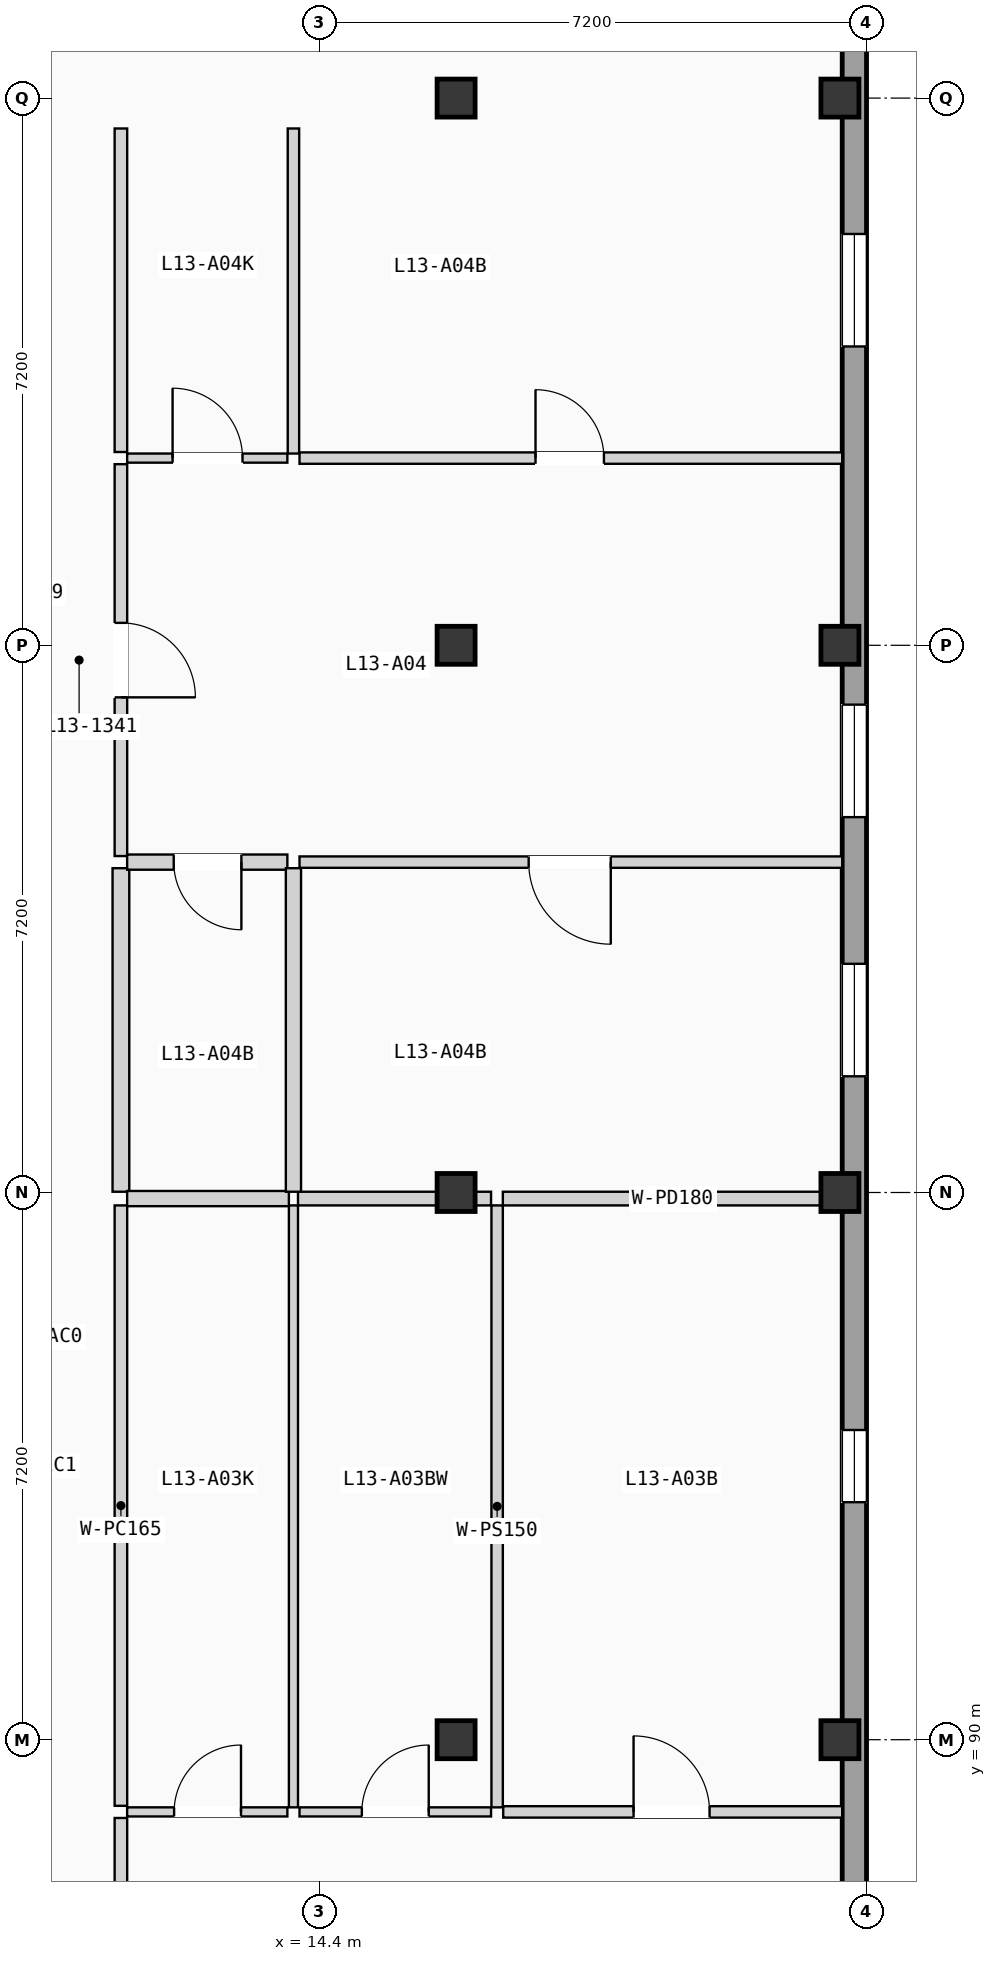
"""IFC4 building model, lengths in metres.
Left out: names, types, materials, properties, quantities, classifications, styles, units other than length and angle.
Written with IfcOpenShell. Run it as: python <this file> out.ifc"""

import sys

from ifc_helpers import new_model, si_unit, direction, frame, frame_2d, origin, origin_2d, place, context, subcontext, project, spatial, rectangle, extrude, element, fill, save


model = new_model("IFC4")
c1 = context("Model", 3, precision=1e-05, world=origin(), true_north=direction((0.0, 1.0)))
c2 = subcontext(c1, "Body", "Model", "MODEL_VIEW")
j1 = project(units=[si_unit("LENGTHUNIT", "METRE"), si_unit("PLANEANGLEUNIT", "RADIAN")], contexts=[c1])
p1 = place(None, origin())
s1 = spatial("IfcSite", under=j1, at=p1, CompositionType="ELEMENT")
p2 = place(p1, origin())
s2 = spatial("IfcBuilding", under=s1, at=p2, CompositionType="ELEMENT")
p3 = place(p2, frame((0.0, 0.0, 43.575)))
s3 = spatial("IfcBuildingStorey", under=s2, at=p3, CompositionType="ELEMENT", Elevation=43.575)
for number, where, z_axis, x_axis in (
    (1, (16.2, 90.0, 0.0), (0.0, 0.0, 1.0), (1.0, 0.0, 0.0)),
    (2, (16.2, 97.2, 0.0), (0.0, 0.0, 1.0), (1.0, 0.0, 0.0)),
    (3, (16.2, 104.4, 0.0), (0.0, 0.0, 1.0), (1.0, 0.0, 0.0)),
    (4, (16.2, 111.6, 0.0), (0.0, 0.0, 1.0), (1.0, 0.0, 0.0)),
    (5, (21.25, 90.0, 0.0), (0.0, 0.0, 1.0), (1.0, 0.0, 0.0)),
    (6, (21.25, 97.2, 0.0), (0.0, 0.0, 1.0), (1.0, 0.0, 0.0)),
    (7, (21.25, 104.4, 0.0), (0.0, 0.0, 1.0), (1.0, 0.0, 0.0)),
    (8, (21.25, 111.6, 0.0), (0.0, 0.0, 1.0), (1.0, 0.0, 0.0)),
):
    element("IfcColumn", number, at=place(p3, frame(where, z_axis=z_axis, x_axis=x_axis)), inside=s3, PredefinedType="COLUMN", context=c2, shape_type="SweptSolid", body=[
        extrude(rectangle(XDim=0.5, YDim=0.5, at=origin_2d()), origin(), (0.0, 0.0, 1.0), 3.15),
    ])
p4 = place(p3, frame((21.44, 68.72, 0.0), z_axis=(0.0, 0.0, 1.0), x_axis=(0.0, 1.0, 0.0)))
e9 = element("IfcWall", 9, at=p4, inside=s3, PredefinedType="SOLIDWALL", context=c2, shape_type="SweptSolid", body=[
    extrude(rectangle(XDim=49.76, YDim=0.32, at=frame_2d((24.88, 0.0))), origin(), (0.0, 0.0, 1.0), 2.6),
])
p5 = place(p4, frame((17.005, 0.0, 0.665)))
e10 = element("IfcOpeningElement", 10, at=p5, cuts=e9, PredefinedType="OPENING", context=c2, shape_type="SweptSolid", body=[
    extrude(rectangle(XDim=1.35, YDim=1.5, at=frame_2d((0.675, 0.75))), frame((0.0, 0.17, 0.0), z_axis=(0.0, -1.0, 0.0), x_axis=(1.0, 0.0, 0.0)), (0.0, 0.0, 1.0), 0.34),
])
p6 = place(p4, frame((9.87, 0.0, 0.515)))
e11 = element("IfcOpeningElement", 11, at=p6, cuts=e9, PredefinedType="OPENING", context=c2, shape_type="SweptSolid", body=[
    extrude(rectangle(XDim=1.35, YDim=1.65, at=frame_2d((0.675, 0.825))), frame((0.0, 0.17, 0.0), z_axis=(0.0, -1.0, 0.0), x_axis=(1.0, 0.0, 0.0)), (0.0, 0.0, 1.0), 0.34),
])
p7 = place(p4, frame((24.405, 0.0, 0.85)))
e12 = element("IfcOpeningElement", 12, at=p7, cuts=e9, PredefinedType="OPENING", context=c2, shape_type="SweptSolid", body=[
    extrude(rectangle(XDim=0.95, YDim=1.2, at=frame_2d((0.475, 0.6))), frame((0.0, 0.17, 0.0), z_axis=(0.0, -1.0, 0.0), x_axis=(1.0, 0.0, 0.0)), (0.0, 0.0, 1.0), 0.34),
])
p8 = place(p4, frame((33.419, 0.0, 0.9)))
e13 = element("IfcOpeningElement", 13, at=p8, cuts=e9, PredefinedType="OPENING", context=c2, shape_type="SweptSolid", body=[
    extrude(rectangle(XDim=1.48, YDim=1.2, at=frame_2d((0.74, 0.6))), frame((0.0, 0.17, 0.0), z_axis=(0.0, -1.0, 0.0), x_axis=(1.0, 0.0, 0.0)), (0.0, 0.0, 1.0), 0.34),
])
p9 = place(p4, frame((30.009, 0.0, 0.815)))
e14 = element("IfcOpeningElement", 14, at=p9, cuts=e9, PredefinedType="OPENING", context=c2, shape_type="SweptSolid", body=[
    extrude(rectangle(XDim=1.48, YDim=1.35, at=frame_2d((0.74, 0.675))), frame((0.0, 0.17, 0.0), z_axis=(0.0, -1.0, 0.0), x_axis=(1.0, 0.0, 0.0)), (0.0, 0.0, 1.0), 0.34),
])
p10 = place(p4, frame((39.612, 0.0, 0.665)))
e15 = element("IfcOpeningElement", 15, at=p10, cuts=e9, PredefinedType="OPENING", context=c2, shape_type="SweptSolid", body=[
    extrude(rectangle(XDim=1.48, YDim=1.5, at=frame_2d((0.74, 0.75))), frame((0.0, 0.17, 0.0), z_axis=(0.0, -1.0, 0.0), x_axis=(1.0, 0.0, 0.0)), (0.0, 0.0, 1.0), 0.34),
])
p11 = place(p3, frame((11.79, 83.83, 0.0), z_axis=(0.0, 0.0, 1.0), x_axis=(0.0, 1.0, 0.0)))
e16 = element("IfcWall", 16, at=p11, inside=s3, PredefinedType="PARTITIONING", context=c2, shape_type="SweptSolid", body=[
    extrude(rectangle(XDim=5.14, YDim=0.165, at=frame_2d((2.57, 0.0))), origin(), (0.0, 0.0, 1.0), 2.87),
])
p12 = place(p11, frame((2.08, 0.0, 0.0)))
e17 = element("IfcOpeningElement", 17, at=p12, cuts=e16, PredefinedType="OPENING", context=c2, shape_type="SweptSolid", body=[
    extrude(rectangle(XDim=0.98, YDim=2.08, at=frame_2d((0.49, 1.04))), frame((0.0, 0.093, 0.0), z_axis=(0.0, -1.0, 0.0), x_axis=(1.0, 0.0, 0.0)), (0.0, 0.0, 1.0), 0.185),
])
p13 = place(p3, frame((11.79, 89.13, 0.0), z_axis=(0.0, 0.0, 1.0), x_axis=(0.0, 1.0, 0.0)))
e18 = element("IfcWall", 18, at=p13, inside=s3, PredefinedType="PARTITIONING", context=c2, shape_type="SweptSolid", body=[
    extrude(rectangle(XDim=7.9, YDim=0.165, at=frame_2d((3.95, 0.0))), origin(), (0.0, 0.0, 1.0), 2.87),
])
p14 = place(p3, frame((11.79, 101.627, 0.0), z_axis=(0.0, 0.0, 1.0), x_axis=(0.0, 1.0, 0.0)))
e19 = element("IfcWall", 19, at=p14, inside=s3, PredefinedType="PARTITIONING", context=c2, shape_type="SweptSolid", body=[
    extrude(rectangle(XDim=5.156, YDim=0.165, at=frame_2d((2.578, 0.0))), origin(), (0.0, 0.0, 1.0), 2.87),
])
p15 = place(p14, frame((2.088, 0.0, 0.0)))
e20 = element("IfcOpeningElement", 20, at=p15, cuts=e19, PredefinedType="OPENING", context=c2, shape_type="SweptSolid", body=[
    extrude(rectangle(XDim=0.98, YDim=2.08, at=frame_2d((0.49, 1.04))), frame((0.0, 0.093, 0.0), z_axis=(0.0, -1.0, 0.0), x_axis=(1.0, 0.0, 0.0)), (0.0, 0.0, 1.0), 0.185),
])
p16 = place(p3, frame((11.79, 97.21, 0.0), z_axis=(0.0, 0.0, 1.0), x_axis=(0.0, 1.0, 0.0)))
e21 = element("IfcWall", 21, at=p16, inside=s3, PredefinedType="PLUMBINGWALL", context=c2, shape_type="SweptSolid", body=[
    extrude(rectangle(XDim=4.257, YDim=0.22, at=frame_2d((2.128, 0.0))), origin(), (0.0, 0.0, 1.0), 2.87),
])
p17 = place(p3, frame((11.79, 106.943, 0.0), z_axis=(0.0, 0.0, 1.0), x_axis=(0.0, 1.0, 0.0)))
e22 = element("IfcWall", 22, at=p17, inside=s3, PredefinedType="PARTITIONING", context=c2, shape_type="SweptSolid", body=[
    extrude(rectangle(XDim=4.257, YDim=0.165, at=frame_2d((2.128, 0.0))), origin(), (0.0, 0.0, 1.0), 2.87),
])
p18 = place(p3, frame((11.872, 89.05, 0.0), z_axis=(0.0, 0.0, 1.0), x_axis=(1.0, 0.0, 0.0)))
e23 = element("IfcWall", 23, at=p18, inside=s3, PredefinedType="PARTITIONING", context=c2, shape_type="SweptSolid", body=[
    extrude(rectangle(XDim=2.108, YDim=0.12, at=frame_2d((1.054, 0.0))), origin(), (0.0, 0.0, 1.0), 2.87),
])
p19 = place(p18, frame((0.618, 0.0, 0.0)))
e24 = element("IfcOpeningElement", 24, at=p19, cuts=e23, PredefinedType="OPENING", context=c2, shape_type="SweptSolid", body=[
    extrude(rectangle(XDim=0.88, YDim=2.02, at=frame_2d((0.44, 1.01))), frame((0.0, 0.07, 0.0), z_axis=(0.0, -1.0, 0.0), x_axis=(1.0, 0.0, 0.0)), (0.0, 0.0, 1.0), 0.14),
])
p20 = place(p3, frame((16.82, 89.05, 0.0), z_axis=(0.0, 0.0, 1.0), x_axis=(1.0, 0.0, 0.0)))
e25 = element("IfcWall", 25, at=p20, inside=s3, PredefinedType="PARTITIONING", context=c2, shape_type="SweptSolid", body=[
    extrude(rectangle(XDim=4.46, YDim=0.15, at=frame_2d((2.23, 0.0))), origin(), (0.0, 0.0, 1.0), 2.87),
])
p21 = place(p20, frame((1.715, 0.0, 0.0)))
e26 = element("IfcOpeningElement", 26, at=p21, cuts=e25, PredefinedType="OPENING", context=c2, shape_type="SweptSolid", body=[
    extrude(rectangle(XDim=1.0, YDim=2.06, at=frame_2d((0.5, 1.03))), frame((0.0, 0.085, 0.0), z_axis=(0.0, -1.0, 0.0), x_axis=(1.0, 0.0, 0.0)), (0.0, 0.0, 1.0), 0.17),
])
p22 = place(p3, frame((14.14, 89.05, 0.0), z_axis=(0.0, 0.0, 1.0), x_axis=(1.0, 0.0, 0.0)))
e27 = element("IfcWall", 27, at=p22, inside=s3, PredefinedType="PARTITIONING", context=c2, shape_type="SweptSolid", body=[
    extrude(rectangle(XDim=2.52, YDim=0.12, at=frame_2d((1.26, 0.0))), origin(), (0.0, 0.0, 1.0), 2.87),
])
p23 = place(p22, frame((0.82, 0.0, 0.0)))
e28 = element("IfcOpeningElement", 28, at=p23, cuts=e27, PredefinedType="OPENING", context=c2, shape_type="SweptSolid", body=[
    extrude(rectangle(XDim=0.88, YDim=2.02, at=frame_2d((0.44, 1.01))), frame((0.0, 0.07, 0.0), z_axis=(0.0, -1.0, 0.0), x_axis=(1.0, 0.0, 0.0)), (0.0, 0.0, 1.0), 0.14),
])
p24 = place(p3, frame((14.06, 89.11, 0.0), z_axis=(0.0, 0.0, 1.0), x_axis=(0.0, 1.0, 0.0)))
e29 = element("IfcWall", 29, at=p24, inside=s3, PredefinedType="PARTITIONING", context=c2, shape_type="SweptSolid", body=[
    extrude(rectangle(XDim=7.92, YDim=0.12, at=frame_2d((3.96, 0.0))), origin(), (0.0, 0.0, 1.0), 2.87),
])
p25 = place(p3, frame((11.872, 97.12, 0.0), z_axis=(0.0, 0.0, 1.0), x_axis=(1.0, 0.0, 0.0)))
e30 = element("IfcWall", 30, at=p25, inside=s3, PredefinedType="PLUMBINGWALL", context=c2, shape_type="SweptSolid", body=[
    extrude(rectangle(XDim=2.128, YDim=0.2, at=frame_2d((1.064, 0.0))), origin(), (0.0, 0.0, 1.0), 2.17),
])
p26 = place(p3, frame((16.74, 89.11, 0.0), z_axis=(0.0, 0.0, 1.0), x_axis=(0.0, 1.0, 0.0)))
e31 = element("IfcWall", 31, at=p26, inside=s3, PredefinedType="PARTITIONING", context=c2, shape_type="SweptSolid", body=[
    extrude(rectangle(XDim=7.92, YDim=0.15, at=frame_2d((3.96, 0.0))), origin(), (0.0, 0.0, 1.0), 2.87),
])
p27 = place(p3, frame((16.815, 97.12, 0.0), z_axis=(0.0, 0.0, 1.0), x_axis=(1.0, 0.0, 0.0)))
e32 = element("IfcWall", 32, at=p27, inside=s3, PredefinedType="PARTITIONING", context=c2, shape_type="SweptSolid", body=[
    extrude(rectangle(XDim=4.465, YDim=0.18, at=frame_2d((2.232, 0.0))), origin(), (0.0, 0.0, 1.0), 2.22),
])
p28 = place(p3, frame((14.12, 97.12, 0.0), z_axis=(0.0, 0.0, 1.0), x_axis=(1.0, 0.0, 0.0)))
e33 = element("IfcWall", 33, at=p28, inside=s3, PredefinedType="PARTITIONING", context=c2, shape_type="SweptSolid", body=[
    extrude(rectangle(XDim=2.54, YDim=0.18, at=frame_2d((1.27, 0.0))), origin(), (0.0, 0.0, 1.0), 2.17),
])
p29 = place(p3, frame((11.872, 101.547, 0.0), z_axis=(0.0, 0.0, 1.0), x_axis=(1.0, 0.0, 0.0)))
e34 = element("IfcWall", 34, at=p29, inside=s3, PredefinedType="PLUMBINGWALL", context=c2, shape_type="SweptSolid", body=[
    extrude(rectangle(XDim=2.108, YDim=0.2, at=frame_2d((1.054, 0.0))), origin(), (0.0, 0.0, 1.0), 2.87),
])
p30 = place(p29, frame((0.613, 0.0, 0.0)))
e35 = element("IfcOpeningElement", 35, at=p30, cuts=e34, PredefinedType="OPENING", context=c2, shape_type="SweptSolid", body=[
    extrude(rectangle(XDim=0.89, YDim=2.03, at=frame_2d((0.445, 1.015))), frame((0.0, 0.11, 0.0), z_axis=(0.0, -1.0, 0.0), x_axis=(1.0, 0.0, 0.0)), (0.0, 0.0, 1.0), 0.22),
])
p31 = place(p3, frame((11.872, 106.863, 0.0), z_axis=(0.0, 0.0, 1.0), x_axis=(1.0, 0.0, 0.0)))
e36 = element("IfcWall", 36, at=p31, inside=s3, PredefinedType="PARTITIONING", context=c2, shape_type="SweptSolid", body=[
    extrude(rectangle(XDim=2.108, YDim=0.12, at=frame_2d((1.054, 0.0))), origin(), (0.0, 0.0, 1.0), 2.87),
])
p32 = place(p31, frame((0.598, 0.0, 0.0)))
e37 = element("IfcOpeningElement", 37, at=p32, cuts=e36, PredefinedType="OPENING", context=c2, shape_type="SweptSolid", body=[
    extrude(rectangle(XDim=0.92, YDim=2.02, at=frame_2d((0.46, 1.01))), frame((0.0, 0.07, 0.0), z_axis=(0.0, -1.0, 0.0), x_axis=(1.0, 0.0, 0.0)), (0.0, 0.0, 1.0), 0.14),
])
p33 = place(p3, frame((14.14, 101.547, 0.0), z_axis=(0.0, 0.0, 1.0), x_axis=(1.0, 0.0, 0.0)))
e38 = element("IfcWall", 38, at=p33, inside=s3, PredefinedType="PARTITIONING", context=c2, shape_type="SweptSolid", body=[
    extrude(rectangle(XDim=7.14, YDim=0.15, at=frame_2d((3.57, 0.0))), origin(), (0.0, 0.0, 1.0), 2.87),
])
p34 = place(p33, frame((3.015, 0.0, 0.0)))
e39 = element("IfcOpeningElement", 39, at=p34, cuts=e38, PredefinedType="OPENING", context=c2, shape_type="SweptSolid", body=[
    extrude(rectangle(XDim=1.08, YDim=2.1, at=frame_2d((0.54, 1.05))), frame((0.0, 0.085, 0.0), z_axis=(0.0, -1.0, 0.0), x_axis=(1.0, 0.0, 0.0)), (0.0, 0.0, 1.0), 0.17),
])
p35 = place(p3, frame((14.14, 106.863, 0.0), z_axis=(0.0, 0.0, 1.0), x_axis=(1.0, 0.0, 0.0)))
e40 = element("IfcWall", 40, at=p35, inside=s3, PredefinedType="PARTITIONING", context=c2, shape_type="SweptSolid", body=[
    extrude(rectangle(XDim=7.14, YDim=0.15, at=frame_2d((3.57, 0.0))), origin(), (0.0, 0.0, 1.0), 2.87),
])
p36 = place(p35, frame((3.105, 0.0, 0.0)))
e41 = element("IfcOpeningElement", 41, at=p36, cuts=e40, PredefinedType="OPENING", context=c2, shape_type="SweptSolid", body=[
    extrude(rectangle(XDim=0.9, YDim=2.04, at=frame_2d((0.45, 1.02))), frame((0.0, 0.085, 0.0), z_axis=(0.0, -1.0, 0.0), x_axis=(1.0, 0.0, 0.0)), (0.0, 0.0, 1.0), 0.17),
])
p37 = place(p3, frame((14.06, 97.21, 0.0), z_axis=(0.0, 0.0, 1.0), x_axis=(0.0, 1.0, 0.0)))
e42 = element("IfcWall", 42, at=p37, inside=s3, PredefinedType="PLUMBINGWALL", context=c2, shape_type="SweptSolid", body=[
    extrude(rectangle(XDim=4.257, YDim=0.2, at=frame_2d((2.128, 0.0))), origin(), (0.0, 0.0, 1.0), 2.87),
])
p38 = place(p3, frame((14.06, 106.923, 0.0), z_axis=(0.0, 0.0, 1.0), x_axis=(0.0, 1.0, 0.0)))
e43 = element("IfcWall", 43, at=p38, inside=s3, PredefinedType="PARTITIONING", context=c2, shape_type="SweptSolid", body=[
    extrude(rectangle(XDim=4.277, YDim=0.15, at=frame_2d((2.138, 0.0))), origin(), (0.0, 0.0, 1.0), 2.87),
])
p39 = place(p7, origin())
e44 = element("IfcWindow", 44, at=p39, inside=s3, PartitioningType="SINGLE_PANEL", PredefinedType="WINDOW", context=c2, shape_type="SweptSolid", body=[
    extrude(rectangle(XDim=0.95, YDim=1.2, at=frame_2d((0.475, 0.6))), frame((0.0, 0.03, 0.0), z_axis=(0.0, -1.0, 0.0), x_axis=(1.0, 0.0, 0.0)), (0.0, 0.0, 1.0), 0.06),
])
fill(e12, e44)
p40 = place(p8, origin())
e45 = element("IfcWindow", 45, at=p40, inside=s3, PartitioningType="SINGLE_PANEL", PredefinedType="WINDOW", context=c2, shape_type="SweptSolid", body=[
    extrude(rectangle(XDim=1.48, YDim=1.2, at=frame_2d((0.74, 0.6))), frame((0.0, 0.03, 0.0), z_axis=(0.0, -1.0, 0.0), x_axis=(1.0, 0.0, 0.0)), (0.0, 0.0, 1.0), 0.06),
])
fill(e13, e45)
p41 = place(p9, origin())
e46 = element("IfcWindow", 46, at=p41, inside=s3, PartitioningType="SINGLE_PANEL", PredefinedType="WINDOW", context=c2, shape_type="SweptSolid", body=[
    extrude(rectangle(XDim=1.48, YDim=1.35, at=frame_2d((0.74, 0.675))), frame((0.0, 0.03, 0.0), z_axis=(0.0, -1.0, 0.0), x_axis=(1.0, 0.0, 0.0)), (0.0, 0.0, 1.0), 0.06),
])
fill(e14, e46)
p42 = place(p10, origin())
e47 = element("IfcWindow", 47, at=p42, inside=s3, PartitioningType="SINGLE_PANEL", PredefinedType="WINDOW", context=c2, shape_type="SweptSolid", body=[
    extrude(rectangle(XDim=1.48, YDim=1.5, at=frame_2d((0.74, 0.75))), frame((0.0, 0.03, 0.0), z_axis=(0.0, -1.0, 0.0), x_axis=(1.0, 0.0, 0.0)), (0.0, 0.0, 1.0), 0.06),
])
fill(e15, e47)
p43 = place(p15, frame((0.98, 0.0, 0.0), z_axis=(0.0, 0.0, 1.0), x_axis=(-1.0, 0.0, 0.0)))
e48 = element("IfcDoor", 48, at=p43, inside=s3, OperationType="SINGLE_SWING_LEFT", PredefinedType="DOOR", context=c2, shape_type="SweptSolid", body=[
    extrude(rectangle(XDim=0.98, YDim=2.08, at=frame_2d((0.49, 1.04))), frame((0.0, 0.025, 0.0), z_axis=(0.0, -1.0, 0.0), x_axis=(1.0, 0.0, 0.0)), (0.0, 0.0, 1.0), 0.05),
])
fill(e20, e48)
p44 = place(p19, origin())
e49 = element("IfcDoor", 49, at=p44, inside=s3, OperationType="SINGLE_SWING_RIGHT", PredefinedType="DOOR", context=c2, shape_type="SweptSolid", body=[
    extrude(rectangle(XDim=0.88, YDim=2.02, at=frame_2d((0.44, 1.01))), frame((0.0, 0.025, 0.0), z_axis=(0.0, -1.0, 0.0), x_axis=(1.0, 0.0, 0.0)), (0.0, 0.0, 1.0), 0.05),
])
fill(e24, e49)
p45 = place(p21, origin())
e50 = element("IfcDoor", 50, at=p45, inside=s3, OperationType="SINGLE_SWING_LEFT", PredefinedType="DOOR", context=c2, shape_type="SweptSolid", body=[
    extrude(rectangle(XDim=1.0, YDim=2.06, at=frame_2d((0.5, 1.03))), frame((0.0, 0.025, 0.0), z_axis=(0.0, -1.0, 0.0), x_axis=(1.0, 0.0, 0.0)), (0.0, 0.0, 1.0), 0.05),
])
fill(e26, e50)
p46 = place(p23, origin())
e51 = element("IfcDoor", 51, at=p46, inside=s3, OperationType="SINGLE_SWING_RIGHT", PredefinedType="DOOR", context=c2, shape_type="SweptSolid", body=[
    extrude(rectangle(XDim=0.88, YDim=2.02, at=frame_2d((0.44, 1.01))), frame((0.0, 0.025, 0.0), z_axis=(0.0, -1.0, 0.0), x_axis=(1.0, 0.0, 0.0)), (0.0, 0.0, 1.0), 0.05),
])
fill(e28, e51)
p47 = place(p30, frame((0.89, 0.0, 0.0), z_axis=(0.0, 0.0, 1.0), x_axis=(-1.0, 0.0, 0.0)))
e52 = element("IfcDoor", 52, at=p47, inside=s3, OperationType="SINGLE_SWING_RIGHT", PredefinedType="DOOR", context=c2, shape_type="SweptSolid", body=[
    extrude(rectangle(XDim=0.89, YDim=2.03, at=frame_2d((0.445, 1.015))), frame((0.0, 0.025, 0.0), z_axis=(0.0, -1.0, 0.0), x_axis=(1.0, 0.0, 0.0)), (0.0, 0.0, 1.0), 0.05),
])
fill(e35, e52)
p48 = place(p32, origin())
e53 = element("IfcDoor", 53, at=p48, inside=s3, OperationType="SINGLE_SWING_LEFT", PredefinedType="DOOR", context=c2, shape_type="SweptSolid", body=[
    extrude(rectangle(XDim=0.92, YDim=2.02, at=frame_2d((0.46, 1.01))), frame((0.0, 0.025, 0.0), z_axis=(0.0, -1.0, 0.0), x_axis=(1.0, 0.0, 0.0)), (0.0, 0.0, 1.0), 0.05),
])
fill(e37, e53)
p49 = place(p34, frame((1.08, 0.0, 0.0), z_axis=(0.0, 0.0, 1.0), x_axis=(-1.0, 0.0, 0.0)))
e54 = element("IfcDoor", 54, at=p49, inside=s3, OperationType="SINGLE_SWING_RIGHT", PredefinedType="DOOR", context=c2, shape_type="SweptSolid", body=[
    extrude(rectangle(XDim=1.08, YDim=2.1, at=frame_2d((0.54, 1.05))), frame((0.0, 0.025, 0.0), z_axis=(0.0, -1.0, 0.0), x_axis=(1.0, 0.0, 0.0)), (0.0, 0.0, 1.0), 0.05),
])
fill(e39, e54)
p50 = place(p36, origin())
e55 = element("IfcDoor", 55, at=p50, inside=s3, OperationType="SINGLE_SWING_LEFT", PredefinedType="DOOR", context=c2, shape_type="SweptSolid", body=[
    extrude(rectangle(XDim=0.9, YDim=2.04, at=frame_2d((0.45, 1.02))), frame((0.0, 0.025, 0.0), z_axis=(0.0, -1.0, 0.0), x_axis=(1.0, 0.0, 0.0)), (0.0, 0.0, 1.0), 0.05),
])
fill(e41, e55)
save(model, sys.argv[1])
